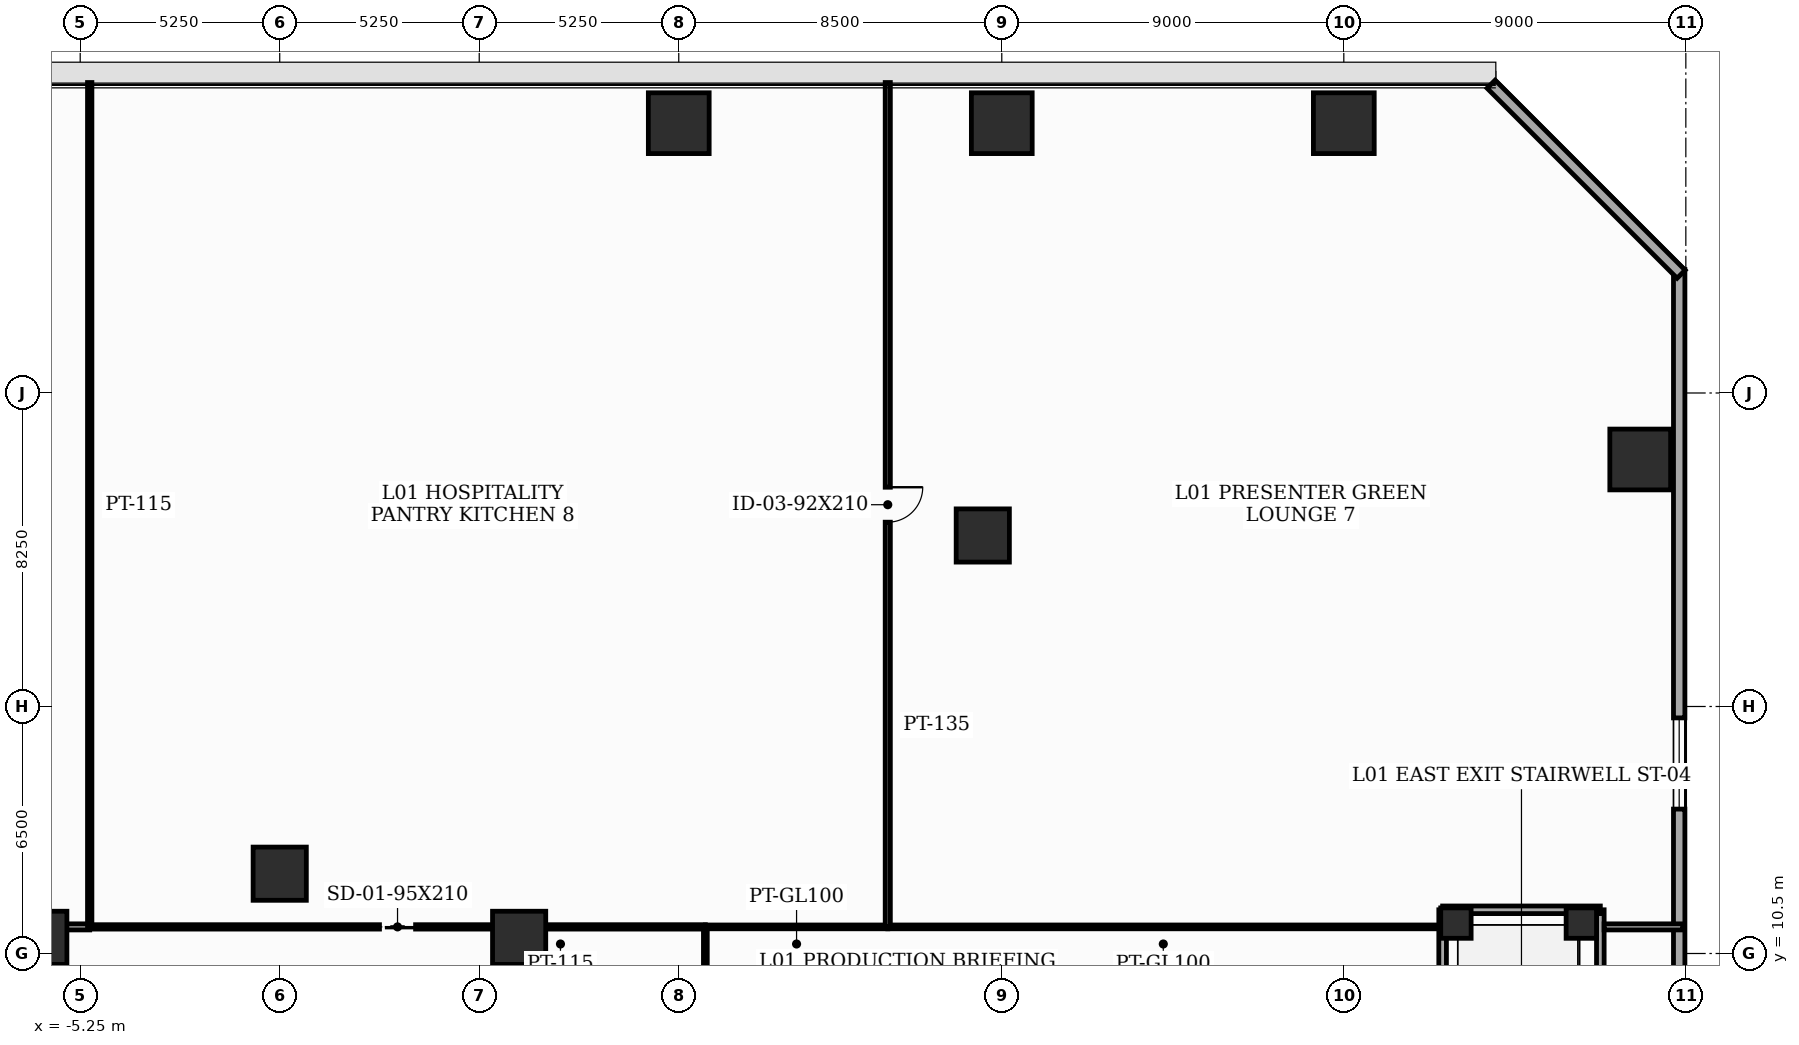
"""IFC4 building model, lengths in metres.
Left out: names, types, materials, properties, quantities, classifications, styles, units other than length and angle.
Written with IfcOpenShell. Run it as: python <this file> out.ifc"""

import sys

from ifc_helpers import new_model, si_unit, direction, frame, frame_2d, origin, origin_2d, place, context, subcontext, project, spatial, rectangle, extrude, element, fill, save


model = new_model("IFC4")
c1 = context("Model", 3, precision=1e-05, world=origin(), true_north=direction((0.0, 1.0)))
c2 = subcontext(c1, "Body", "Model", "MODEL_VIEW")
j1 = project(units=[si_unit("LENGTHUNIT", "METRE"), si_unit("PLANEANGLEUNIT", "RADIAN")], contexts=[c1])
p1 = place(None, origin())
s1 = spatial("IfcSite", under=j1, at=p1, CompositionType="ELEMENT")
p2 = place(p1, origin())
s2 = spatial("IfcBuilding", under=s1, at=p2, CompositionType="ELEMENT")
p3 = place(p2, frame((0.0, 0.0, 5.2)))
s3 = spatial("IfcBuildingStorey", under=s2, at=p3, CompositionType="ELEMENT", Elevation=5.2)
for number, where, z_axis, x_axis in (
    (1, (6.3, 10.912, 0.0), (0.0, 0.0, 1.0), (1.0, 0.0, 0.0)),
    (2, (0.0, 12.6, 0.0), (0.0, 0.0, 1.0), (1.0, 0.0, 0.0)),
    (3, (-6.3, 10.912, 0.0), (0.0, 0.0, 1.0), (1.0, 0.0, 0.0)),
):
    element("IfcColumn", number, at=place(p3, frame(where, z_axis=z_axis, x_axis=x_axis)), inside=s3, PredefinedType="COLUMN", context=c2, shape_type="SweptSolid", body=[
        extrude(rectangle(XDim=1.4, YDim=1.4, at=origin_2d()), origin(), (0.0, 0.0, 1.0), 5.2),
    ])
for number, where, z_axis, x_axis in (
    (4, (35.8, 23.5, 0.0), (0.0, 0.0, 1.0), (1.0, 0.0, 0.0)),
    (5, (28.0, 32.35, 0.0), (0.0, 0.0, 1.0), (1.0, 0.0, 0.0)),
    (6, (19.0, 32.35, 0.0), (0.0, 0.0, 1.0), (1.0, 0.0, 0.0)),
    (7, (10.5, 32.35, 0.0), (0.0, 0.0, 1.0), (1.0, 0.0, 0.0)),
):
    element("IfcColumn", number, at=place(p3, frame(where, z_axis=z_axis, x_axis=x_axis)), inside=s3, PredefinedType="COLUMN", context=c2, shape_type="SweptSolid", body=[
        extrude(rectangle(XDim=1.6, YDim=1.6, at=origin_2d()), origin(), (0.0, 0.0, 1.0), 5.2),
    ])
p4 = place(p3, frame((18.5, 21.5, 0.0), z_axis=(0.0, 0.0, 1.0), x_axis=(1.0, 0.0, 0.0)))
e8 = element("IfcColumn", 8, at=p4, inside=s3, PredefinedType="COLUMN", context=c2, shape_type="SweptSolid", body=[
    extrude(rectangle(XDim=1.4, YDim=1.4, at=origin_2d()), origin(), (0.0, 0.0, 1.0), 5.2),
])
for number, where, z_axis, x_axis in (
    (9, (34.25, 11.3, 0.0), (0.0, 0.0, 1.0), (1.0, 0.0, 0.0)),
    (10, (30.95, 11.3, 0.0), (0.0, 0.0, 1.0), (1.0, 0.0, 0.0)),
):
    element("IfcColumn", number, at=place(p3, frame(where, z_axis=z_axis, x_axis=x_axis)), inside=s3, PredefinedType="COLUMN", context=c2, shape_type="SweptSolid", body=[
        extrude(rectangle(XDim=0.8, YDim=0.8, at=origin_2d()), origin(), (0.0, 0.0, 1.0), 5.2),
    ])
p5 = place(p3, frame((36.825, -19.5, 0.0), z_axis=(0.0, 0.0, 1.0), x_axis=(0.0, 1.0, 0.0)))
e11 = element("IfcWall", 11, at=p5, inside=s3, PredefinedType="SOLIDWALL", context=c2, shape_type="SweptSolid", body=[
    extrude(rectangle(XDim=48.0, YDim=0.3, at=frame_2d((24.0, 0.0))), origin(), (0.0, 0.0, 1.0), 4.95),
])
p6 = place(p5, frame((3.6, 0.0, 0.9)))
e12 = element("IfcOpeningElement", 12, at=p6, cuts=e11, PredefinedType="OPENING", context=c2, shape_type="SweptSolid", body=[
    extrude(rectangle(XDim=2.4, YDim=1.35, at=frame_2d((1.2, 0.675))), frame((0.0, 0.16, 0.0), z_axis=(0.0, -1.0, 0.0), x_axis=(1.0, 0.0, 0.0)), (0.0, 0.0, 1.0), 0.32),
])
p7 = place(p5, frame((22.8, 0.0, 0.9)))
e13 = element("IfcOpeningElement", 13, at=p7, cuts=e11, PredefinedType="OPENING", context=c2, shape_type="SweptSolid", body=[
    extrude(rectangle(XDim=1.8, YDim=1.35, at=frame_2d((0.9, 0.675))), frame((0.0, 0.16, 0.0), z_axis=(0.0, -1.0, 0.0), x_axis=(1.0, 0.0, 0.0)), (0.0, 0.0, 1.0), 0.32),
])
p8 = place(p5, frame((33.8, 0.0, 0.9)))
e14 = element("IfcOpeningElement", 14, at=p8, cuts=e11, PredefinedType="OPENING", context=c2, shape_type="SweptSolid", body=[
    extrude(rectangle(XDim=2.4, YDim=1.35, at=frame_2d((1.2, 0.675))), frame((0.0, 0.16, 0.0), z_axis=(0.0, -1.0, 0.0), x_axis=(1.0, 0.0, 0.0)), (0.0, 0.0, 1.0), 0.32),
])
p9 = place(p3, frame((36.876, 28.376, 0.0), z_axis=(0.0, 0.0, 1.0), x_axis=(-0.707106781187, 0.707106781187, 0.0)))
e15 = element("IfcWall", 15, at=p9, inside=s3, PredefinedType="SOLIDWALL", context=c2, shape_type="SweptSolid", body=[
    extrude(rectangle(XDim=7.071, YDim=0.3, at=frame_2d((3.536, 0.0))), origin(), (0.0, 0.0, 1.0), 4.95),
])
p10 = place(p3, frame((34.75, 4.2, 0.0), z_axis=(0.0, 0.0, 1.0), x_axis=(0.0, 1.0, 0.0)))
e16 = element("IfcWall", 16, at=p10, inside=s3, PredefinedType="SOLIDWALL", context=c2, shape_type="SweptSolid", body=[
    extrude(rectangle(XDim=7.45, YDim=0.2, at=frame_2d((3.725, 0.0))), origin(), (0.0, 0.0, 1.0), 4.95),
])
p11 = place(p3, frame((34.75, 11.65, 0.0), z_axis=(0.0, 0.0, 1.0), x_axis=(-1.0, 0.0, 0.0)))
e17 = element("IfcWall", 17, at=p11, inside=s3, PredefinedType="SOLIDWALL", context=c2, shape_type="SweptSolid", body=[
    extrude(rectangle(XDim=4.15, YDim=0.2, at=frame_2d((2.075, 0.0))), origin(), (0.0, 0.0, 1.0), 4.95),
])
p12 = place(p3, frame((30.6, 11.65, 0.0), z_axis=(0.0, 0.0, 1.0), x_axis=(0.0, -1.0, 0.0)))
e18 = element("IfcWall", 18, at=p12, inside=s3, PredefinedType="SOLIDWALL", context=c2, shape_type="SweptSolid", body=[
    extrude(rectangle(XDim=7.45, YDim=0.2, at=frame_2d((3.725, 0.0))), origin(), (0.0, 0.0, 1.0), 4.95),
])
p13 = place(p12, frame((6.04, 0.0, 0.0)))
e19 = element("IfcOpeningElement", 19, at=p13, cuts=e18, PredefinedType="OPENING", context=c2, shape_type="SweptSolid", body=[
    extrude(rectangle(XDim=1.05, YDim=2.15, at=frame_2d((0.525, 1.075))), frame((0.0, 0.11, 0.0), z_axis=(0.0, -1.0, 0.0), x_axis=(1.0, 0.0, 0.0)), (0.0, 0.0, 1.0), 0.22),
])
p14 = place(p3, frame((11.2, 8.4, 0.0), z_axis=(0.0, 0.0, 1.0), x_axis=(0.0, 1.0, 0.0)))
e20 = element("IfcWall", 20, at=p14, inside=s3, PredefinedType="MOVABLE", context=c2, shape_type="SweptSolid", body=[
    extrude(rectangle(XDim=2.8, YDim=0.1, at=frame_2d((1.4, 0.0))), origin(), (0.0, 0.0, 1.0), 4.95),
])
p15 = place(p3, frame((11.2, 11.2, 0.0), z_axis=(0.0, 0.0, 1.0), x_axis=(-1.0, 0.0, 0.0)))
e21 = element("IfcWall", 21, at=p15, inside=s3, PredefinedType="PARTITIONING", context=c2, shape_type="SweptSolid", body=[
    extrude(rectangle(XDim=16.2, YDim=0.115, at=frame_2d((8.1, 0.0))), origin(), (0.0, 0.0, 1.0), 3.435),
])
p16 = place(p15, frame((7.625, 0.0, 0.0)))
e22 = element("IfcOpeningElement", 22, at=p16, cuts=e21, PredefinedType="OPENING", context=c2, shape_type="SweptSolid", body=[
    extrude(rectangle(XDim=0.95, YDim=2.1, at=frame_2d((0.475, 1.05))), frame((0.0, 0.067, 0.0), z_axis=(0.0, -1.0, 0.0), x_axis=(1.0, 0.0, 0.0)), (0.0, 0.0, 1.0), 0.135),
])
p17 = place(p3, frame((-5.0, 11.2, 0.0), z_axis=(0.0, 0.0, 1.0), x_axis=(-1.0, 0.0, 0.0)))
e23 = element("IfcWall", 23, at=p17, inside=s3, PredefinedType="PARTITIONING", context=c2, shape_type="SweptSolid", body=[
    extrude(rectangle(XDim=6.2, YDim=0.16, at=frame_2d((3.1, 0.0))), origin(), (0.0, 0.0, 1.0), 3.435),
])
p18 = place(p3, frame((36.92, 11.2, 0.0), z_axis=(0.0, 0.0, 1.0), x_axis=(-1.0, 0.0, 0.0)))
e24 = element("IfcWall", 24, at=p18, inside=s3, PredefinedType="PARTITIONING", context=c2, shape_type="SweptSolid", body=[
    extrude(rectangle(XDim=2.07, YDim=0.16, at=frame_2d((1.035, 0.0))), origin(), (0.0, 0.0, 1.0), 4.235),
])
p19 = place(p3, frame((30.5, 11.2, 0.0), z_axis=(0.0, 0.0, 1.0), x_axis=(-1.0, 0.0, 0.0)))
e25 = element("IfcWall", 25, at=p19, inside=s3, PredefinedType="MOVABLE", context=c2, shape_type="SweptSolid", body=[
    extrude(rectangle(XDim=14.5, YDim=0.1, at=frame_2d((7.25, 0.0))), origin(), (0.0, 0.0, 1.0), 4.95),
])
p20 = place(p3, frame((16.0, 11.2, 0.0), z_axis=(0.0, 0.0, 1.0), x_axis=(-1.0, 0.0, 0.0)))
e26 = element("IfcWall", 26, at=p20, inside=s3, PredefinedType="MOVABLE", context=c2, shape_type="SweptSolid", body=[
    extrude(rectangle(XDim=4.8, YDim=0.1, at=frame_2d((2.4, 0.0))), origin(), (0.0, 0.0, 1.0), 4.235),
])
p21 = place(p3, frame((16.0, 33.42, 0.0), z_axis=(0.0, 0.0, 1.0), x_axis=(0.0, -1.0, 0.0)))
e27 = element("IfcWall", 27, at=p21, inside=s3, PredefinedType="PARTITIONING", context=c2, shape_type="SweptSolid", body=[
    extrude(rectangle(XDim=22.22, YDim=0.135, at=frame_2d((11.11, 0.0))), origin(), (0.0, 0.0, 1.0), 3.435),
])
p22 = place(p21, frame((10.65, 0.0, 0.0)))
e28 = element("IfcOpeningElement", 28, at=p22, cuts=e27, PredefinedType="OPENING", context=c2, shape_type="SweptSolid", body=[
    extrude(rectangle(XDim=0.92, YDim=2.1, at=frame_2d((0.46, 1.05))), frame((0.0, 0.077, 0.0), z_axis=(0.0, -1.0, 0.0), x_axis=(1.0, 0.0, 0.0)), (0.0, 0.0, 1.0), 0.155),
])
p23 = place(p3, frame((-5.0, 33.42, 0.0), z_axis=(0.0, 0.0, 1.0), x_axis=(0.0, -1.0, 0.0)))
e29 = element("IfcWall", 29, at=p23, inside=s3, PredefinedType="PARTITIONING", context=c2, shape_type="SweptSolid", body=[
    extrude(rectangle(XDim=22.22, YDim=0.115, at=frame_2d((11.11, 0.0))), origin(), (0.0, 0.0, 1.0), 4.235),
])
p24 = place(p8, origin())
e30 = element("IfcWindow", 30, at=p24, inside=s3, PartitioningType="SINGLE_PANEL", PredefinedType="WINDOW", context=c2, shape_type="SweptSolid", body=[
    extrude(rectangle(XDim=2.4, YDim=1.35, at=frame_2d((1.2, 0.675))), frame((0.0, 0.03, 0.0), z_axis=(0.0, -1.0, 0.0), x_axis=(1.0, 0.0, 0.0)), (0.0, 0.0, 1.0), 0.06),
])
fill(e14, e30)
p25 = place(p16, origin())
e31 = element("IfcDoor", 31, at=p25, inside=s3, OperationType="SLIDING_TO_LEFT", PredefinedType="DOOR", context=c2, shape_type="SweptSolid", body=[
    extrude(rectangle(XDim=0.95, YDim=2.1, at=frame_2d((0.475, 1.05))), frame((0.0, 0.025, 0.0), z_axis=(0.0, -1.0, 0.0), x_axis=(1.0, 0.0, 0.0)), (0.0, 0.0, 1.0), 0.05),
])
fill(e22, e31)
p26 = place(p22, origin())
e32 = element("IfcDoor", 32, at=p26, inside=s3, OperationType="SINGLE_SWING_LEFT", PredefinedType="DOOR", context=c2, shape_type="SweptSolid", body=[
    extrude(rectangle(XDim=0.92, YDim=2.1, at=frame_2d((0.46, 1.05))), frame((0.0, 0.025, 0.0), z_axis=(0.0, -1.0, 0.0), x_axis=(1.0, 0.0, 0.0)), (0.0, 0.0, 1.0), 0.05),
])
fill(e28, e32)
save(model, sys.argv[1])
